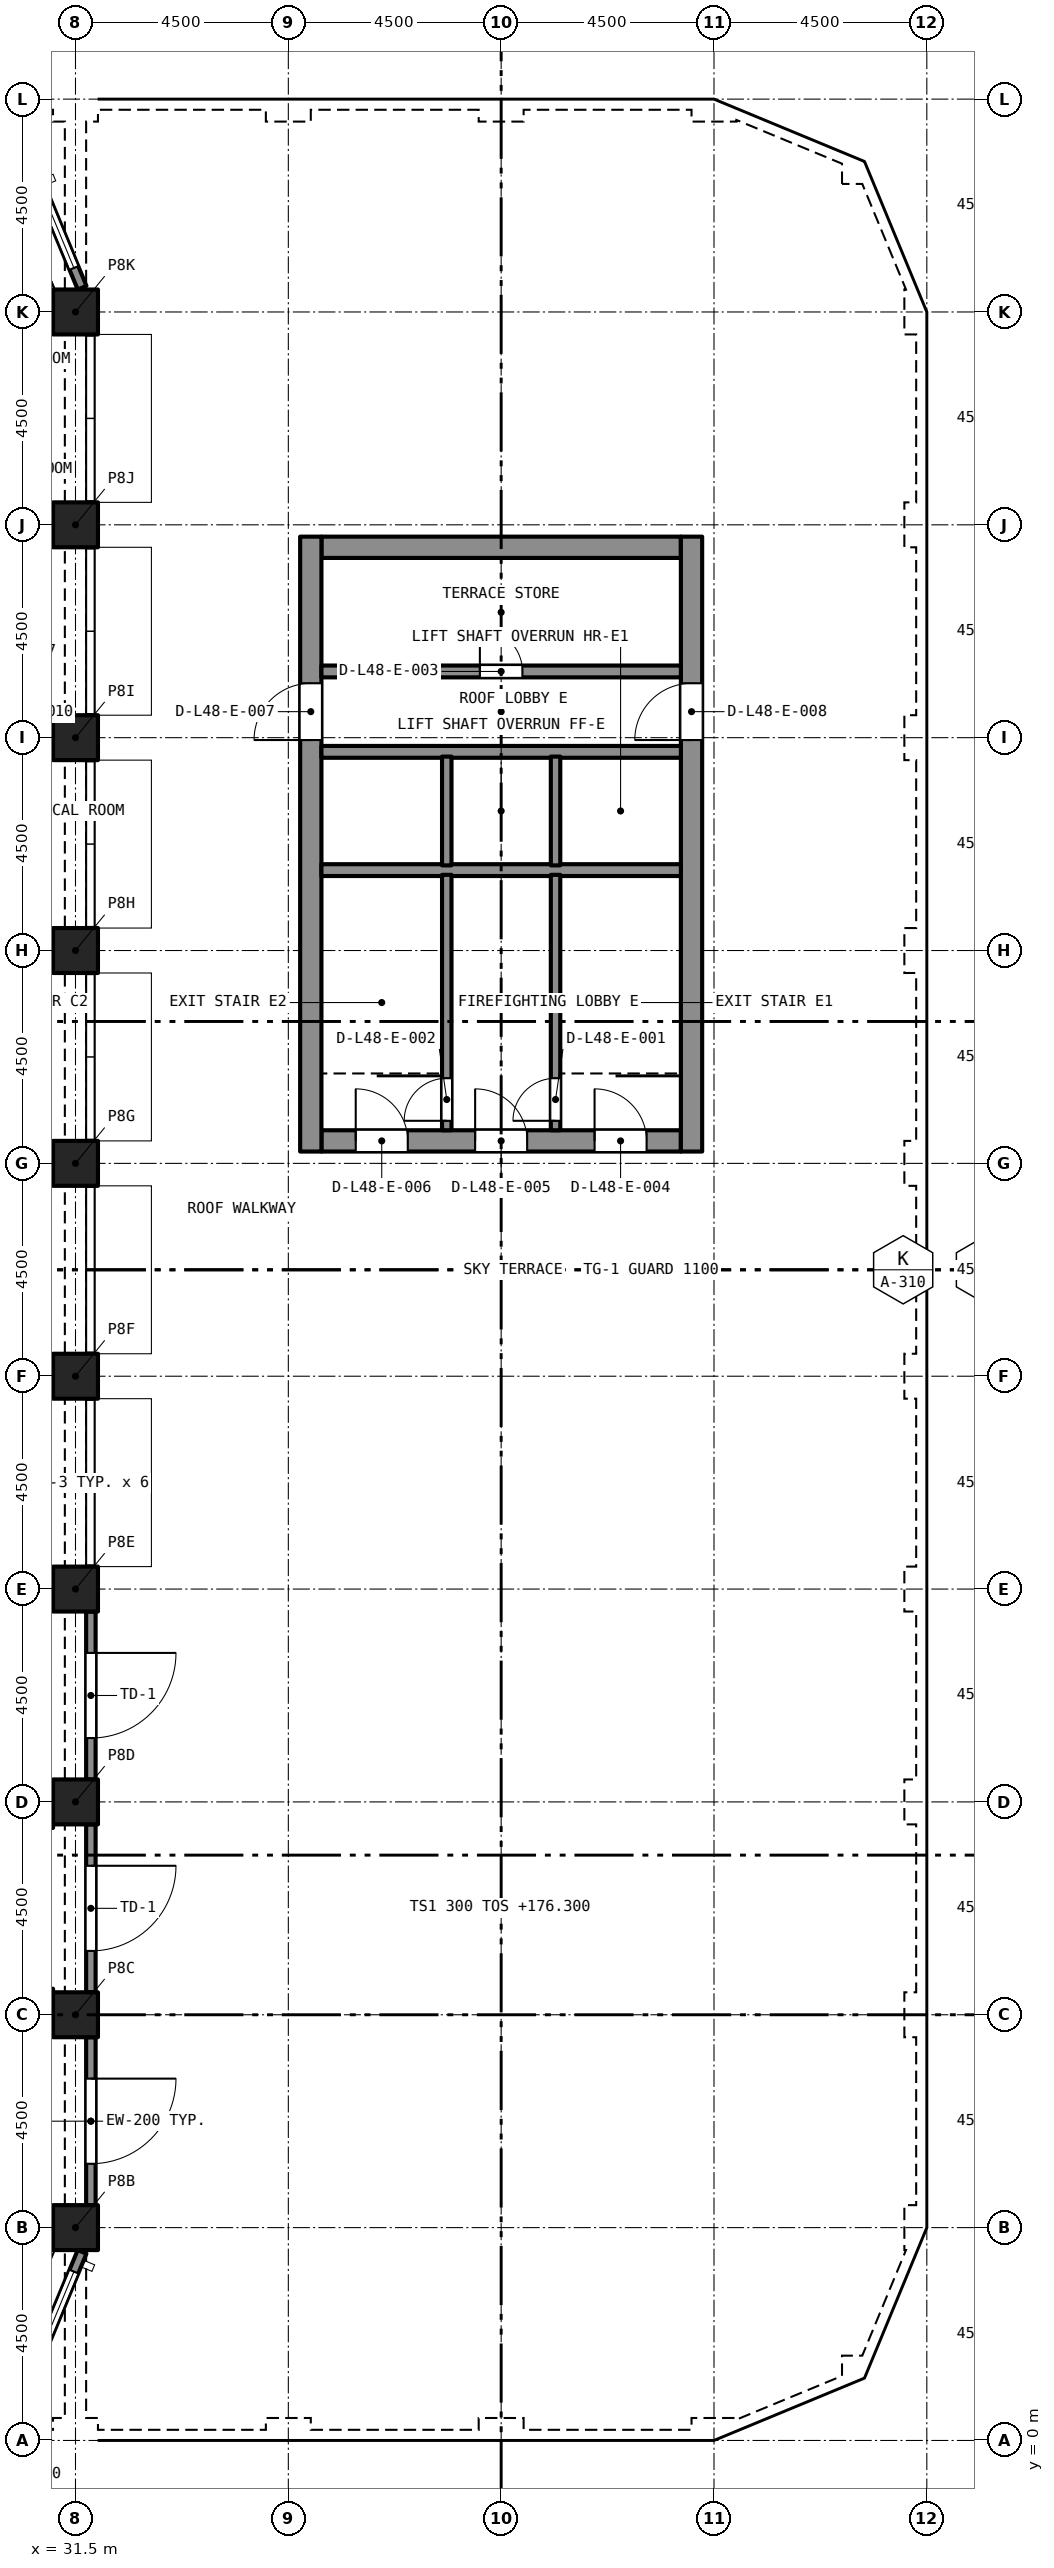
"""IFC4 building model, lengths in metres.
Left out: names, types, materials, properties, quantities, classifications, styles, units other than length and angle.
Written with IfcOpenShell. Run it as: python <this file> out.ifc"""

import sys

from ifc_helpers import new_model, si_unit, direction, frame, frame_2d, origin, origin_2d, place, context, subcontext, project, spatial, rectangle, extrude, element, fill, save


model = new_model("IFC4")
c1 = context("Model", 3, precision=1e-05, world=origin(), true_north=direction((0.0, 1.0)))
c2 = subcontext(c1, "Body", "Model", "MODEL_VIEW")
j1 = project(units=[si_unit("LENGTHUNIT", "METRE"), si_unit("PLANEANGLEUNIT", "RADIAN")], contexts=[c1])
p1 = place(None, origin())
s1 = spatial("IfcSite", under=j1, at=p1, CompositionType="ELEMENT")
p2 = place(p1, origin())
s2 = spatial("IfcBuilding", under=s1, at=p2, CompositionType="ELEMENT")
p3 = place(p2, frame((0.0, 0.0, 176.3)))
s3 = spatial("IfcBuildingStorey", under=s2, at=p3, CompositionType="ELEMENT", Elevation=176.3)
for number, where, z_axis, x_axis in (
    (1, (31.5, 4.5, 0.0), (0.0, 0.0, 1.0), (1.0, 0.0, 0.0)),
    (2, (31.5, 9.0, 0.0), (0.0, 0.0, 1.0), (1.0, 0.0, 0.0)),
    (3, (31.5, 13.5, 0.0), (0.0, 0.0, 1.0), (1.0, 0.0, 0.0)),
    (4, (31.5, 18.0, 0.0), (0.0, 0.0, 1.0), (1.0, 0.0, 0.0)),
    (5, (31.5, 22.5, 0.0), (0.0, 0.0, 1.0), (1.0, 0.0, 0.0)),
    (6, (31.5, 27.0, 0.0), (0.0, 0.0, 1.0), (1.0, 0.0, 0.0)),
    (7, (31.5, 31.5, 0.0), (0.0, 0.0, 1.0), (1.0, 0.0, 0.0)),
    (8, (31.5, 36.0, 0.0), (0.0, 0.0, 1.0), (1.0, 0.0, 0.0)),
    (9, (31.5, 40.5, 0.0), (0.0, 0.0, 1.0), (1.0, 0.0, 0.0)),
    (10, (31.5, 45.0, 0.0), (0.0, 0.0, 1.0), (1.0, 0.0, 0.0)),
):
    element("IfcColumn", number, at=place(p3, frame(where, z_axis=z_axis, x_axis=x_axis)), inside=s3, PredefinedType="COLUMN", context=c2, shape_type="SweptSolid", body=[
        extrude(rectangle(XDim=0.95, YDim=0.95, at=origin_2d()), origin(), (0.0, 0.0, 1.0), 3.2),
    ])
p4 = place(p3, frame((36.7, 27.475, 0.0), z_axis=(0.0, 0.0, 1.0), x_axis=(1.0, 0.0, 0.0)))
e11 = element("IfcWall", 11, at=p4, inside=s3, PredefinedType="SOLIDWALL", context=c2, shape_type="SweptSolid", body=[
    extrude(rectangle(XDim=7.6, YDim=0.45, at=frame_2d((3.8, 0.0))), origin(), (0.0, 0.0, 1.0), 3.2),
])
p5 = place(p4, frame((5.775, 0.0, 0.0)))
e12 = element("IfcOpeningElement", 12, at=p5, cuts=e11, PredefinedType="OPENING", context=c2, shape_type="SweptSolid", body=[
    extrude(rectangle(XDim=1.1, YDim=2.1, at=frame_2d((0.55, 1.05))), frame((0.0, 0.235, 0.0), z_axis=(0.0, -1.0, 0.0), x_axis=(1.0, 0.0, 0.0)), (0.0, 0.0, 1.0), 0.47),
])
p6 = place(p4, frame((3.25, 0.0, 0.0)))
e13 = element("IfcOpeningElement", 13, at=p6, cuts=e11, PredefinedType="OPENING", context=c2, shape_type="SweptSolid", body=[
    extrude(rectangle(XDim=1.1, YDim=2.1, at=frame_2d((0.55, 1.05))), frame((0.0, 0.235, 0.0), z_axis=(0.0, -1.0, 0.0), x_axis=(1.0, 0.0, 0.0)), (0.0, 0.0, 1.0), 0.47),
])
p7 = place(p4, frame((0.725, 0.0, 0.0)))
e14 = element("IfcOpeningElement", 14, at=p7, cuts=e11, PredefinedType="OPENING", context=c2, shape_type="SweptSolid", body=[
    extrude(rectangle(XDim=1.1, YDim=2.1, at=frame_2d((0.55, 1.05))), frame((0.0, 0.235, 0.0), z_axis=(0.0, -1.0, 0.0), x_axis=(1.0, 0.0, 0.0)), (0.0, 0.0, 1.0), 0.47),
])
p8 = place(p3, frame((36.7, 40.025, 0.0), z_axis=(0.0, 0.0, 1.0), x_axis=(1.0, 0.0, 0.0)))
e15 = element("IfcWall", 15, at=p8, inside=s3, PredefinedType="SOLIDWALL", context=c2, shape_type="SweptSolid", body=[
    extrude(rectangle(XDim=7.6, YDim=0.45, at=frame_2d((3.8, 0.0))), origin(), (0.0, 0.0, 1.0), 3.2),
])
p9 = place(p3, frame((36.475, 27.25, 0.0), z_axis=(0.0, 0.0, 1.0), x_axis=(0.0, 1.0, 0.0)))
e16 = element("IfcWall", 16, at=p9, inside=s3, PredefinedType="SOLIDWALL", context=c2, shape_type="SweptSolid", body=[
    extrude(rectangle(XDim=13.0, YDim=0.45, at=frame_2d((6.5, 0.0))), origin(), (0.0, 0.0, 1.0), 3.2),
])
p10 = place(p9, frame((8.7, 0.0, 0.0)))
e17 = element("IfcOpeningElement", 17, at=p10, cuts=e16, PredefinedType="OPENING", context=c2, shape_type="SweptSolid", body=[
    extrude(rectangle(XDim=1.2, YDim=2.1, at=frame_2d((0.6, 1.05))), frame((0.0, 0.235, 0.0), z_axis=(0.0, -1.0, 0.0), x_axis=(1.0, 0.0, 0.0)), (0.0, 0.0, 1.0), 0.47),
])
p11 = place(p3, frame((44.525, 27.25, 0.0), z_axis=(0.0, 0.0, 1.0), x_axis=(0.0, 1.0, 0.0)))
e18 = element("IfcWall", 18, at=p11, inside=s3, PredefinedType="SOLIDWALL", context=c2, shape_type="SweptSolid", body=[
    extrude(rectangle(XDim=13.0, YDim=0.45, at=frame_2d((6.5, 0.0))), origin(), (0.0, 0.0, 1.0), 3.2),
])
p12 = place(p11, frame((8.7, 0.0, 0.0)))
e19 = element("IfcOpeningElement", 19, at=p12, cuts=e18, PredefinedType="OPENING", context=c2, shape_type="SweptSolid", body=[
    extrude(rectangle(XDim=1.2, YDim=2.1, at=frame_2d((0.6, 1.05))), frame((0.0, 0.235, 0.0), z_axis=(0.0, -1.0, 0.0), x_axis=(1.0, 0.0, 0.0)), (0.0, 0.0, 1.0), 0.47),
])
p13 = place(p3, frame((31.639, 3.987, 0.0), z_axis=(0.0, 0.0, 1.0), x_axis=(-0.382680855588, -0.923880599843, 0.0)))
e20 = element("IfcWall", 20, at=p13, inside=s3, PredefinedType="SOLIDWALL", context=c2, shape_type="SweptSolid", body=[
    extrude(rectangle(XDim=2.403, YDim=0.2, at=frame_2d((1.201, 0.0))), origin(), (0.0, 0.0, 1.0), 3.2),
])
p14 = place(p13, frame((0.451, 0.0, 0.45)))
e21 = element("IfcOpeningElement", 21, at=p14, cuts=e20, PredefinedType="OPENING", context=c2, shape_type="SweptSolid", body=[
    extrude(rectangle(XDim=1.7, YDim=1.95, at=frame_2d((0.85, 0.975))), frame((0.0, 0.11, 0.0), z_axis=(0.0, -1.0, 0.0), x_axis=(1.0, 0.0, 0.0)), (0.0, 0.0, 1.0), 0.22),
])
p15 = place(p3, frame((31.825, 8.525, 0.0), z_axis=(0.0, 0.0, 1.0), x_axis=(0.0, -1.0, 0.0)))
e22 = element("IfcWall", 22, at=p15, inside=s3, PredefinedType="SOLIDWALL", context=c2, shape_type="SweptSolid", body=[
    extrude(rectangle(XDim=3.55, YDim=0.2, at=frame_2d((1.775, 0.0))), origin(), (0.0, 0.0, 1.0), 3.2),
])
p16 = place(p15, frame((0.875, 0.0, 0.0)))
e23 = element("IfcOpeningElement", 23, at=p16, cuts=e22, PredefinedType="OPENING", context=c2, shape_type="SweptSolid", body=[
    extrude(rectangle(XDim=1.8, YDim=2.4, at=frame_2d((0.9, 1.2))), frame((0.0, 0.11, 0.0), z_axis=(0.0, -1.0, 0.0), x_axis=(1.0, 0.0, 0.0)), (0.0, 0.0, 1.0), 0.22),
])
p17 = place(p3, frame((31.825, 13.025, 0.0), z_axis=(0.0, 0.0, 1.0), x_axis=(0.0, -1.0, 0.0)))
e24 = element("IfcWall", 24, at=p17, inside=s3, PredefinedType="SOLIDWALL", context=c2, shape_type="SweptSolid", body=[
    extrude(rectangle(XDim=3.55, YDim=0.2, at=frame_2d((1.775, 0.0))), origin(), (0.0, 0.0, 1.0), 3.2),
])
p18 = place(p17, frame((0.875, 0.0, 0.0)))
e25 = element("IfcOpeningElement", 25, at=p18, cuts=e24, PredefinedType="OPENING", context=c2, shape_type="SweptSolid", body=[
    extrude(rectangle(XDim=1.8, YDim=2.4, at=frame_2d((0.9, 1.2))), frame((0.0, 0.11, 0.0), z_axis=(0.0, -1.0, 0.0), x_axis=(1.0, 0.0, 0.0)), (0.0, 0.0, 1.0), 0.22),
])
p19 = place(p3, frame((31.825, 17.525, 0.0), z_axis=(0.0, 0.0, 1.0), x_axis=(0.0, -1.0, 0.0)))
e26 = element("IfcWall", 26, at=p19, inside=s3, PredefinedType="SOLIDWALL", context=c2, shape_type="SweptSolid", body=[
    extrude(rectangle(XDim=3.55, YDim=0.2, at=frame_2d((1.775, 0.0))), origin(), (0.0, 0.0, 1.0), 3.2),
])
p20 = place(p19, frame((0.875, 0.0, 0.0)))
e27 = element("IfcOpeningElement", 27, at=p20, cuts=e26, PredefinedType="OPENING", context=c2, shape_type="SweptSolid", body=[
    extrude(rectangle(XDim=1.8, YDim=2.4, at=frame_2d((0.9, 1.2))), frame((0.0, 0.11, 0.0), z_axis=(0.0, -1.0, 0.0), x_axis=(1.0, 0.0, 0.0)), (0.0, 0.0, 1.0), 0.22),
])
p21 = place(p3, frame((30.72, 47.733, 0.0), z_axis=(0.0, 0.0, 1.0), x_axis=(0.382680855588, -0.923880599843, 0.0)))
e28 = element("IfcWall", 28, at=p21, inside=s3, PredefinedType="SOLIDWALL", context=c2, shape_type="SweptSolid", body=[
    extrude(rectangle(XDim=2.403, YDim=0.2, at=frame_2d((1.201, 0.0))), origin(), (0.0, 0.0, 1.0), 3.2),
])
p22 = place(p21, frame((0.251, 0.0, 0.45)))
e29 = element("IfcOpeningElement", 29, at=p22, cuts=e28, PredefinedType="OPENING", context=c2, shape_type="SweptSolid", body=[
    extrude(rectangle(XDim=1.7, YDim=1.95, at=frame_2d((0.85, 0.975))), frame((0.0, 0.11, 0.0), z_axis=(0.0, -1.0, 0.0), x_axis=(1.0, 0.0, 0.0)), (0.0, 0.0, 1.0), 0.22),
])
p23 = place(p3, frame((29.0, 40.25, 0.0), z_axis=(0.0, 0.0, 1.0), x_axis=(1.0, 0.0, 0.0)))
e30 = element("IfcWall", 30, at=p23, inside=s3, PredefinedType="PARTITIONING", context=c2, shape_type="SweptSolid", body=[
    extrude(rectangle(XDim=2.025, YDim=0.15, at=frame_2d((1.012, 0.0))), origin(), (0.0, 0.0, 1.0), 2.75),
])
p24 = place(p3, frame((25.725, 22.5, 0.0), z_axis=(0.0, 0.0, 1.0), x_axis=(1.0, 0.0, 0.0)))
e31 = element("IfcWall", 31, at=p24, inside=s3, PredefinedType="PARTITIONING", context=c2, shape_type="SweptSolid", body=[
    extrude(rectangle(XDim=5.3, YDim=0.15, at=frame_2d((2.65, 0.0))), origin(), (0.0, 0.0, 1.0), 2.75),
])
p25 = place(p3, frame((31.025, 9.475, 0.0), z_axis=(0.0, 0.0, 1.0), x_axis=(-1.0, 0.0, 0.0)))
e32 = element("IfcWall", 32, at=p25, inside=s3, PredefinedType="PARTITIONING", context=c2, shape_type="SweptSolid", body=[
    extrude(rectangle(XDim=8.525, YDim=0.15, at=frame_2d((4.262, 0.0))), origin(), (0.0, 0.0, 1.0), 2.75),
])
p26 = place(p25, frame((3.762, 0.0, 0.0)))
e33 = element("IfcOpeningElement", 33, at=p26, cuts=e32, PredefinedType="OPENING", context=c2, shape_type="SweptSolid", body=[
    extrude(rectangle(XDim=1.0, YDim=2.1, at=frame_2d((0.5, 1.05))), frame((0.0, 0.085, 0.0), z_axis=(0.0, -1.0, 0.0), x_axis=(1.0, 0.0, 0.0)), (0.0, 0.0, 1.0), 0.17),
])
p27 = place(p3, frame((25.725, 13.025, 0.0), z_axis=(0.0, 0.0, 1.0), x_axis=(1.0, 0.0, 0.0)))
e34 = element("IfcWall", 34, at=p27, inside=s3, PredefinedType="PARTITIONING", context=c2, shape_type="SweptSolid", body=[
    extrude(rectangle(XDim=5.3, YDim=0.15, at=frame_2d((2.65, 0.0))), origin(), (0.0, 0.0, 1.0), 2.75),
])
for number, where, z_axis, x_axis in (
    (35, (36.7, 33.2, 0.0), (0.0, 0.0, 1.0), (1.0, 0.0, 0.0)),
    (36, (36.7, 35.7, 0.0), (0.0, 0.0, 1.0), (1.0, 0.0, 0.0)),
):
    element("IfcWall", number, at=place(p3, frame(where, z_axis=z_axis, x_axis=x_axis)), inside=s3, PredefinedType="SOLIDWALL", context=c2, shape_type="SweptSolid", body=[
        extrude(rectangle(XDim=7.6, YDim=0.25, at=frame_2d((3.8, 0.0))), origin(), (0.0, 0.0, 1.0), 2.9),
    ])
p28 = place(p3, frame((36.7, 37.4, 0.0), z_axis=(0.0, 0.0, 1.0), x_axis=(1.0, 0.0, 0.0)))
e37 = element("IfcWall", 37, at=p28, inside=s3, PredefinedType="SOLIDWALL", context=c2, shape_type="SweptSolid", body=[
    extrude(rectangle(XDim=7.6, YDim=0.25, at=frame_2d((3.8, 0.0))), origin(), (0.0, 0.0, 1.0), 2.9),
])
p29 = place(p28, frame((3.35, 0.0, 0.0)))
e38 = element("IfcOpeningElement", 38, at=p29, cuts=e37, PredefinedType="OPENING", context=c2, shape_type="SweptSolid", body=[
    extrude(rectangle(XDim=0.9, YDim=2.1, at=frame_2d((0.45, 1.05))), frame((0.0, 0.135, 0.0), z_axis=(0.0, -1.0, 0.0), x_axis=(1.0, 0.0, 0.0)), (0.0, 0.0, 1.0), 0.27),
])
p30 = place(p3, frame((41.65, 27.7, 0.0), z_axis=(0.0, 0.0, 1.0), x_axis=(0.0, 1.0, 0.0)))
e39 = element("IfcWall", 39, at=p30, inside=s3, PredefinedType="SOLIDWALL", context=c2, shape_type="SweptSolid", body=[
    extrude(rectangle(XDim=5.4, YDim=0.2, at=frame_2d((2.7, 0.0))), origin(), (0.0, 0.0, 1.0), 2.9),
])
p31 = place(p30, frame((0.2, 0.0, 0.0)))
e40 = element("IfcOpeningElement", 40, at=p31, cuts=e39, PredefinedType="OPENING", context=c2, shape_type="SweptSolid", body=[
    extrude(rectangle(XDim=0.9, YDim=2.1, at=frame_2d((0.45, 1.05))), frame((0.0, 0.11, 0.0), z_axis=(0.0, -1.0, 0.0), x_axis=(1.0, 0.0, 0.0)), (0.0, 0.0, 1.0), 0.22),
])
p32 = place(p3, frame((39.35, 27.7, 0.0), z_axis=(0.0, 0.0, 1.0), x_axis=(0.0, 1.0, 0.0)))
e41 = element("IfcWall", 41, at=p32, inside=s3, PredefinedType="SOLIDWALL", context=c2, shape_type="SweptSolid", body=[
    extrude(rectangle(XDim=5.4, YDim=0.2, at=frame_2d((2.7, 0.0))), origin(), (0.0, 0.0, 1.0), 2.9),
])
p33 = place(p32, frame((0.2, 0.0, 0.0)))
e42 = element("IfcOpeningElement", 42, at=p33, cuts=e41, PredefinedType="OPENING", context=c2, shape_type="SweptSolid", body=[
    extrude(rectangle(XDim=0.9, YDim=2.1, at=frame_2d((0.45, 1.05))), frame((0.0, 0.11, 0.0), z_axis=(0.0, -1.0, 0.0), x_axis=(1.0, 0.0, 0.0)), (0.0, 0.0, 1.0), 0.22),
])
for number, where, z_axis, x_axis in (
    (43, (41.65, 33.3, 0.0), (0.0, 0.0, 1.0), (0.0, 1.0, 0.0)),
    (44, (39.35, 33.3, 0.0), (0.0, 0.0, 1.0), (0.0, 1.0, 0.0)),
):
    element("IfcWall", number, at=place(p3, frame(where, z_axis=z_axis, x_axis=x_axis)), inside=s3, PredefinedType="SOLIDWALL", context=c2, shape_type="SweptSolid", body=[
        extrude(rectangle(XDim=2.3, YDim=0.2, at=frame_2d((1.15, 0.0))), origin(), (0.0, 0.0, 1.0), 2.9),
    ])
p34 = place(p14, origin())
e45 = element("IfcWindow", 45, at=p34, inside=s3, PartitioningType="SINGLE_PANEL", PredefinedType="WINDOW", context=c2, shape_type="SweptSolid", body=[
    extrude(rectangle(XDim=1.7, YDim=1.95, at=frame_2d((0.85, 0.975))), frame((0.0, 0.03, 0.0), z_axis=(0.0, -1.0, 0.0), x_axis=(1.0, 0.0, 0.0)), (0.0, 0.0, 1.0), 0.06),
])
fill(e21, e45)
p35 = place(p22, origin())
e46 = element("IfcWindow", 46, at=p35, inside=s3, PartitioningType="SINGLE_PANEL", PredefinedType="WINDOW", context=c2, shape_type="SweptSolid", body=[
    extrude(rectangle(XDim=1.7, YDim=1.95, at=frame_2d((0.85, 0.975))), frame((0.0, 0.03, 0.0), z_axis=(0.0, -1.0, 0.0), x_axis=(1.0, 0.0, 0.0)), (0.0, 0.0, 1.0), 0.06),
])
fill(e29, e46)
p36 = place(p16, origin())
e47 = element("IfcDoor", 47, at=p36, inside=s3, OperationType="DOUBLE_DOOR_SINGLE_SWING", PredefinedType="DOOR", context=c2, shape_type="SweptSolid", body=[
    extrude(rectangle(XDim=1.8, YDim=2.4, at=frame_2d((0.9, 1.2))), frame((0.0, 0.025, 0.0), z_axis=(0.0, -1.0, 0.0), x_axis=(1.0, 0.0, 0.0)), (0.0, 0.0, 1.0), 0.05),
])
fill(e23, e47)
p37 = place(p18, origin())
e48 = element("IfcDoor", 48, at=p37, inside=s3, OperationType="DOUBLE_DOOR_SINGLE_SWING", PredefinedType="DOOR", context=c2, shape_type="SweptSolid", body=[
    extrude(rectangle(XDim=1.8, YDim=2.4, at=frame_2d((0.9, 1.2))), frame((0.0, 0.025, 0.0), z_axis=(0.0, -1.0, 0.0), x_axis=(1.0, 0.0, 0.0)), (0.0, 0.0, 1.0), 0.05),
])
fill(e25, e48)
p38 = place(p20, origin())
e49 = element("IfcDoor", 49, at=p38, inside=s3, OperationType="DOUBLE_DOOR_SINGLE_SWING", PredefinedType="DOOR", context=c2, shape_type="SweptSolid", body=[
    extrude(rectangle(XDim=1.8, YDim=2.4, at=frame_2d((0.9, 1.2))), frame((0.0, 0.025, 0.0), z_axis=(0.0, -1.0, 0.0), x_axis=(1.0, 0.0, 0.0)), (0.0, 0.0, 1.0), 0.05),
])
fill(e27, e49)
p39 = place(p31, origin())
e50 = element("IfcDoor", 50, at=p39, inside=s3, OperationType="SINGLE_SWING_LEFT", PredefinedType="DOOR", context=c2, shape_type="SweptSolid", body=[
    extrude(rectangle(XDim=0.9, YDim=2.1, at=frame_2d((0.45, 1.05))), frame((0.0, 0.025, 0.0), z_axis=(0.0, -1.0, 0.0), x_axis=(1.0, 0.0, 0.0)), (0.0, 0.0, 1.0), 0.05),
])
fill(e40, e50)
p40 = place(p33, origin())
e51 = element("IfcDoor", 51, at=p40, inside=s3, OperationType="SINGLE_SWING_LEFT", PredefinedType="DOOR", context=c2, shape_type="SweptSolid", body=[
    extrude(rectangle(XDim=0.9, YDim=2.1, at=frame_2d((0.45, 1.05))), frame((0.0, 0.025, 0.0), z_axis=(0.0, -1.0, 0.0), x_axis=(1.0, 0.0, 0.0)), (0.0, 0.0, 1.0), 0.05),
])
fill(e42, e51)
p41 = place(p29, origin())
e52 = element("IfcDoor", 52, at=p41, inside=s3, OperationType="SINGLE_SWING_LEFT", PredefinedType="DOOR", context=c2, shape_type="SweptSolid", body=[
    extrude(rectangle(XDim=0.9, YDim=2.1, at=frame_2d((0.45, 1.05))), frame((0.0, 0.025, 0.0), z_axis=(0.0, -1.0, 0.0), x_axis=(1.0, 0.0, 0.0)), (0.0, 0.0, 1.0), 0.05),
])
fill(e38, e52)
p42 = place(p5, origin())
e53 = element("IfcDoor", 53, at=p42, inside=s3, OperationType="SINGLE_SWING_LEFT", PredefinedType="DOOR", context=c2, shape_type="SweptSolid", body=[
    extrude(rectangle(XDim=1.1, YDim=2.1, at=frame_2d((0.55, 1.05))), frame((0.0, 0.025, 0.0), z_axis=(0.0, -1.0, 0.0), x_axis=(1.0, 0.0, 0.0)), (0.0, 0.0, 1.0), 0.05),
])
fill(e12, e53)
p43 = place(p6, origin())
e54 = element("IfcDoor", 54, at=p43, inside=s3, OperationType="SINGLE_SWING_LEFT", PredefinedType="DOOR", context=c2, shape_type="SweptSolid", body=[
    extrude(rectangle(XDim=1.1, YDim=2.1, at=frame_2d((0.55, 1.05))), frame((0.0, 0.025, 0.0), z_axis=(0.0, -1.0, 0.0), x_axis=(1.0, 0.0, 0.0)), (0.0, 0.0, 1.0), 0.05),
])
fill(e13, e54)
p44 = place(p7, origin())
e55 = element("IfcDoor", 55, at=p44, inside=s3, OperationType="SINGLE_SWING_LEFT", PredefinedType="DOOR", context=c2, shape_type="SweptSolid", body=[
    extrude(rectangle(XDim=1.1, YDim=2.1, at=frame_2d((0.55, 1.05))), frame((0.0, 0.025, 0.0), z_axis=(0.0, -1.0, 0.0), x_axis=(1.0, 0.0, 0.0)), (0.0, 0.0, 1.0), 0.05),
])
fill(e14, e55)
p45 = place(p10, origin())
e56 = element("IfcDoor", 56, at=p45, inside=s3, OperationType="SINGLE_SWING_LEFT", PredefinedType="DOOR", context=c2, shape_type="SweptSolid", body=[
    extrude(rectangle(XDim=1.2, YDim=2.1, at=frame_2d((0.6, 1.05))), frame((0.0, 0.025, 0.0), z_axis=(0.0, -1.0, 0.0), x_axis=(1.0, 0.0, 0.0)), (0.0, 0.0, 1.0), 0.05),
])
fill(e17, e56)
p46 = place(p12, origin())
e57 = element("IfcDoor", 57, at=p46, inside=s3, OperationType="SINGLE_SWING_LEFT", PredefinedType="DOOR", context=c2, shape_type="SweptSolid", body=[
    extrude(rectangle(XDim=1.2, YDim=2.1, at=frame_2d((0.6, 1.05))), frame((0.0, 0.025, 0.0), z_axis=(0.0, -1.0, 0.0), x_axis=(1.0, 0.0, 0.0)), (0.0, 0.0, 1.0), 0.05),
])
fill(e19, e57)
save(model, sys.argv[1])
